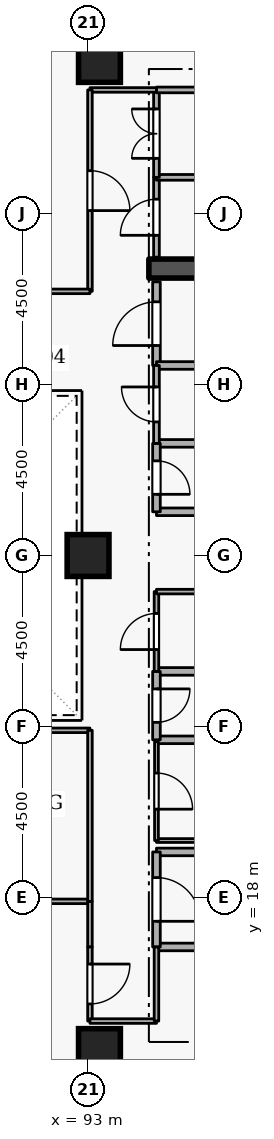
"""IFC4 building model, lengths in metres.
Left out: names, types, materials, properties, quantities, classifications, styles, units other than length and angle.
Written with IfcOpenShell. Run it as: python <this file> out.ifc"""

import sys

from ifc_helpers import new_model, si_unit, direction, frame, frame_2d, origin, origin_2d, place, context, subcontext, project, spatial, rectangle, extrude, element, fill, save


model = new_model("IFC4")
c1 = context("Model", 3, precision=1e-05, world=origin(), true_north=direction((0.0, 1.0)))
c2 = subcontext(c1, "Body", "Model", "MODEL_VIEW")
j1 = project(units=[si_unit("LENGTHUNIT", "METRE"), si_unit("PLANEANGLEUNIT", "RADIAN")], contexts=[c1])
p1 = place(None, origin())
s1 = spatial("IfcSite", under=j1, at=p1, CompositionType="ELEMENT")
p2 = place(p1, origin())
s2 = spatial("IfcBuilding", under=s1, at=p2, CompositionType="ELEMENT")
p3 = place(p2, frame((0.0, 0.0, 159.9)))
s3 = spatial("IfcBuildingStorey", under=s2, at=p3, CompositionType="ELEMENT", Elevation=159.9)
p4 = place(p3, frame((94.6, 34.55, 0.0), z_axis=(0.0, 0.0, 1.0), x_axis=(1.0, 0.0, 0.0)))
e1 = element("IfcWall", 1, at=p4, inside=s3, PredefinedType="SHEAR", context=c2, shape_type="SweptSolid", body=[
    extrude(rectangle(XDim=5.8, YDim=0.5, at=frame_2d((2.9, 0.0))), origin(), (0.0, 0.0, 1.0), 3.6),
])
for number, where, z_axis, x_axis in (
    (2, (93.3, 14.0, 0.0), (0.0, 0.0, 1.0), (1.0, 0.0, 0.0)),
    (3, (93.3, 40.0, 0.0), (0.0, 0.0, 1.0), (1.0, 0.0, 0.0)),
    (4, (93.0, 27.0, 0.0), (0.0, 0.0, 1.0), (1.0, 0.0, 0.0)),
):
    element("IfcColumn", number, at=place(p3, frame(where, z_axis=z_axis, x_axis=x_axis)), inside=s3, PredefinedType="COLUMN", context=c2, shape_type="SweptSolid", body=[
        extrude(rectangle(XDim=1.1, YDim=1.1, at=origin_2d()), origin(), (0.0, 0.0, 1.0), 3.6),
    ])
p5 = place(p3, frame((94.8, 16.7, 0.0), z_axis=(0.0, 0.0, 1.0), x_axis=(1.0, 0.0, 0.0)))
e5 = element("IfcWall", 5, at=p5, inside=s3, PredefinedType="STANDARD", context=c2, shape_type="SweptSolid", body=[
    extrude(rectangle(XDim=5.7, YDim=0.2, at=frame_2d((2.85, 0.0))), origin(), (0.0, 0.0, 1.0), 3.34),
])
p6 = place(p3, frame((97.1, 19.2, 0.0), z_axis=(0.0, 0.0, 1.0), x_axis=(-1.0, 0.0, 0.0)))
e6 = element("IfcWall", 6, at=p6, inside=s3, PredefinedType="STANDARD", context=c2, shape_type="SweptSolid", body=[
    extrude(rectangle(XDim=2.3, YDim=0.2, at=frame_2d((1.15, 0.0))), origin(), (0.0, 0.0, 1.0), 2.545),
])
p7 = place(p3, frame((94.8, 19.2, 0.0), z_axis=(0.0, 0.0, 1.0), x_axis=(0.0, -1.0, 0.0)))
e7 = element("IfcWall", 7, at=p7, inside=s3, PredefinedType="STANDARD", context=c2, shape_type="SweptSolid", body=[
    extrude(rectangle(XDim=2.5, YDim=0.2, at=frame_2d((1.25, 0.0))), origin(), (0.0, 0.0, 1.0), 3.34),
])
p8 = place(p7, frame((0.675, 0.0, 0.0)))
e8 = element("IfcOpeningElement", 8, at=p8, cuts=e7, PredefinedType="OPENING", context=c2, shape_type="SweptSolid", body=[
    extrude(rectangle(XDim=1.15, YDim=2.1, at=frame_2d((0.575, 1.05))), frame((0.0, 0.11, 0.0), z_axis=(0.0, -1.0, 0.0), x_axis=(1.0, 0.0, 0.0)), (0.0, 0.0, 1.0), 0.22),
])
for number, where, z_axis, x_axis in (
    (9, (94.8, 28.15, 0.0), (0.0, 0.0, 1.0), (1.0, 0.0, 0.0)),
    (10, (96.85, 29.95, 0.0), (0.0, 0.0, 1.0), (-1.0, 0.0, 0.0)),
):
    element("IfcWall", number, at=place(p3, frame(where, z_axis=z_axis, x_axis=x_axis)), inside=s3, PredefinedType="STANDARD", context=c2, shape_type="SweptSolid", body=[
        extrude(rectangle(XDim=2.05, YDim=0.2, at=frame_2d((1.025, 0.0))), origin(), (0.0, 0.0, 1.0), 3.34),
    ])
p9 = place(p3, frame((94.8, 29.95, 0.0), z_axis=(0.0, 0.0, 1.0), x_axis=(0.0, -1.0, 0.0)))
e11 = element("IfcWall", 11, at=p9, inside=s3, PredefinedType="STANDARD", context=c2, shape_type="SweptSolid", body=[
    extrude(rectangle(XDim=1.8, YDim=0.2, at=frame_2d((0.9, 0.0))), origin(), (0.0, 0.0, 1.0), 3.34),
])
p10 = place(p9, frame((0.46, 0.0, 0.0)))
e12 = element("IfcOpeningElement", 12, at=p10, cuts=e11, PredefinedType="OPENING", context=c2, shape_type="SweptSolid", body=[
    extrude(rectangle(XDim=0.88, YDim=2.04, at=frame_2d((0.44, 1.02))), frame((0.0, 0.11, 0.0), z_axis=(0.0, -1.0, 0.0), x_axis=(1.0, 0.0, 0.0)), (0.0, 0.0, 1.0), 0.22),
])
for number, where, z_axis, x_axis in (
    (13, (94.8, 22.15, 0.0), (0.0, 0.0, 1.0), (1.0, 0.0, 0.0)),
    (14, (96.85, 23.95, 0.0), (0.0, 0.0, 1.0), (-1.0, 0.0, 0.0)),
):
    element("IfcWall", number, at=place(p3, frame(where, z_axis=z_axis, x_axis=x_axis)), inside=s3, PredefinedType="STANDARD", context=c2, shape_type="SweptSolid", body=[
        extrude(rectangle(XDim=2.05, YDim=0.2, at=frame_2d((1.025, 0.0))), origin(), (0.0, 0.0, 1.0), 3.34),
    ])
p11 = place(p3, frame((94.8, 23.95, 0.0), z_axis=(0.0, 0.0, 1.0), x_axis=(0.0, -1.0, 0.0)))
e15 = element("IfcWall", 15, at=p11, inside=s3, PredefinedType="STANDARD", context=c2, shape_type="SweptSolid", body=[
    extrude(rectangle(XDim=1.8, YDim=0.2, at=frame_2d((0.9, 0.0))), origin(), (0.0, 0.0, 1.0), 3.34),
])
p12 = place(p11, frame((0.46, 0.0, 0.0)))
e16 = element("IfcOpeningElement", 16, at=p12, cuts=e15, PredefinedType="OPENING", context=c2, shape_type="SweptSolid", body=[
    extrude(rectangle(XDim=0.88, YDim=2.04, at=frame_2d((0.44, 1.02))), frame((0.0, 0.11, 0.0), z_axis=(0.0, -1.0, 0.0), x_axis=(1.0, 0.0, 0.0)), (0.0, 0.0, 1.0), 0.22),
])
p13 = place(p3, frame((94.8, 32.0, 0.0), z_axis=(0.0, 0.0, 1.0), x_axis=(0.0, 1.0, 0.0)))
e17 = element("IfcWall", 17, at=p13, inside=s3, PredefinedType="STANDARD", context=c2, shape_type="SweptSolid", body=[
    extrude(rectangle(XDim=2.2, YDim=0.2, at=frame_2d((1.1, 0.0))), origin(), (0.0, 0.0, 1.0), 3.34),
])
p14 = place(p13, frame((0.525, 0.0, 0.0)))
e18 = element("IfcOpeningElement", 18, at=p14, cuts=e17, PredefinedType="OPENING", context=c2, shape_type="SweptSolid", body=[
    extrude(rectangle(XDim=1.15, YDim=2.1, at=frame_2d((0.575, 1.05))), frame((0.0, 0.11, 0.0), z_axis=(0.0, -1.0, 0.0), x_axis=(1.0, 0.0, 0.0)), (0.0, 0.0, 1.0), 0.22),
])
p15 = place(p3, frame((96.85, 32.0, 0.0), z_axis=(0.0, 0.0, 1.0), x_axis=(-1.0, 0.0, 0.0)))
e19 = element("IfcWall", 19, at=p15, inside=s3, PredefinedType="STANDARD", context=c2, shape_type="SweptSolid", body=[
    extrude(rectangle(XDim=2.05, YDim=0.2, at=frame_2d((1.025, 0.0))), origin(), (0.0, 0.0, 1.0), 3.34),
])
p16 = place(p3, frame((94.8, 19.5, 0.0), z_axis=(0.0, 0.0, 1.0), x_axis=(1.0, 0.0, 0.0)))
e20 = element("IfcWall", 20, at=p16, inside=s3, PredefinedType="PARTITIONING", context=c2, shape_type="SweptSolid", body=[
    extrude(rectangle(XDim=2.05, YDim=0.1, at=frame_2d((1.025, 0.0))), origin(), (0.0, 0.0, 1.0), 2.545),
])
p17 = place(p3, frame((94.8, 22.1, 0.0), z_axis=(0.0, 0.0, 1.0), x_axis=(0.0, -1.0, 0.0)))
e21 = element("IfcWall", 21, at=p17, inside=s3, PredefinedType="PARTITIONING", context=c2, shape_type="SweptSolid", body=[
    extrude(rectangle(XDim=2.6, YDim=0.1, at=frame_2d((1.3, 0.0))), origin(), (0.0, 0.0, 1.0), 3.34),
])
p18 = place(p17, frame((0.825, 0.0, 0.0)))
e22 = element("IfcOpeningElement", 22, at=p18, cuts=e21, PredefinedType="OPENING", context=c2, shape_type="SweptSolid", body=[
    extrude(rectangle(XDim=0.95, YDim=2.1, at=frame_2d((0.475, 1.05))), frame((0.0, 0.06, 0.0), z_axis=(0.0, -1.0, 0.0), x_axis=(1.0, 0.0, 0.0)), (0.0, 0.0, 1.0), 0.12),
])
p19 = place(p3, frame((94.8, 23.95, 0.0), z_axis=(0.0, 0.0, 1.0), x_axis=(0.0, 1.0, 0.0)))
e23 = element("IfcWall", 23, at=p19, inside=s3, PredefinedType="PARTITIONING", context=c2, shape_type="SweptSolid", body=[
    extrude(rectangle(XDim=2.1, YDim=0.12, at=frame_2d((1.05, 0.0))), origin(), (0.0, 0.0, 1.0), 3.34),
])
p20 = place(p19, frame((0.575, 0.0, 0.0)))
e24 = element("IfcOpeningElement", 24, at=p20, cuts=e23, PredefinedType="OPENING", context=c2, shape_type="SweptSolid", body=[
    extrude(rectangle(XDim=0.95, YDim=2.1, at=frame_2d((0.475, 1.05))), frame((0.0, 0.07, 0.0), z_axis=(0.0, -1.0, 0.0), x_axis=(1.0, 0.0, 0.0)), (0.0, 0.0, 1.0), 0.14),
])
p21 = place(p3, frame((94.8, 26.05, 0.0), z_axis=(0.0, 0.0, 1.0), x_axis=(1.0, 0.0, 0.0)))
e25 = element("IfcWall", 25, at=p21, inside=s3, PredefinedType="PARTITIONING", context=c2, shape_type="SweptSolid", body=[
    extrude(rectangle(XDim=2.05, YDim=0.12, at=frame_2d((1.025, 0.0))), origin(), (0.0, 0.0, 1.0), 3.34),
])
p22 = place(p3, frame((94.8, 29.95, 0.0), z_axis=(0.0, 0.0, 1.0), x_axis=(0.0, 1.0, 0.0)))
e26 = element("IfcWall", 26, at=p22, inside=s3, PredefinedType="PARTITIONING", context=c2, shape_type="SweptSolid", body=[
    extrude(rectangle(XDim=2.05, YDim=0.15, at=frame_2d((1.025, 0.0))), origin(), (0.0, 0.0, 1.0), 3.34),
])
p23 = place(p22, frame((0.565, 0.0, 0.0)))
e27 = element("IfcOpeningElement", 27, at=p23, cuts=e26, PredefinedType="OPENING", context=c2, shape_type="SweptSolid", body=[
    extrude(rectangle(XDim=0.92, YDim=2.08, at=frame_2d((0.46, 1.04))), frame((0.0, 0.085, 0.0), z_axis=(0.0, -1.0, 0.0), x_axis=(1.0, 0.0, 0.0)), (0.0, 0.0, 1.0), 0.17),
])
p24 = place(p3, frame((94.8, 34.85, 0.0), z_axis=(0.0, 0.0, 1.0), x_axis=(0.0, 1.0, 0.0)))
e28 = element("IfcWall", 28, at=p24, inside=s3, PredefinedType="PARTITIONING", context=c2, shape_type="SweptSolid", body=[
    extrude(rectangle(XDim=2.1, YDim=0.15, at=frame_2d((1.05, 0.0))), origin(), (0.0, 0.0, 1.0), 3.34),
])
p25 = place(p24, frame((0.575, 0.0, 0.0)))
e29 = element("IfcOpeningElement", 29, at=p25, cuts=e28, PredefinedType="OPENING", context=c2, shape_type="SweptSolid", body=[
    extrude(rectangle(XDim=0.95, YDim=2.1, at=frame_2d((0.475, 1.05))), frame((0.0, 0.085, 0.0), z_axis=(0.0, -1.0, 0.0), x_axis=(1.0, 0.0, 0.0)), (0.0, 0.0, 1.0), 0.17),
])
p26 = place(p3, frame((94.8, 36.95, 0.0), z_axis=(0.0, 0.0, 1.0), x_axis=(1.0, 0.0, 0.0)))
e30 = element("IfcWall", 30, at=p26, inside=s3, PredefinedType="PARTITIONING", context=c2, shape_type="SweptSolid", body=[
    extrude(rectangle(XDim=5.65, YDim=0.15, at=frame_2d((2.825, 0.0))), origin(), (0.0, 0.0, 1.0), 3.34),
])
p27 = place(p3, frame((94.8, 36.95, 0.0), z_axis=(0.0, 0.0, 1.0), x_axis=(0.0, 1.0, 0.0)))
e31 = element("IfcWall", 31, at=p27, inside=s3, PredefinedType="PARTITIONING", context=c2, shape_type="SweptSolid", body=[
    extrude(rectangle(XDim=2.3, YDim=0.15, at=frame_2d((1.15, 0.0))), origin(), (0.0, 0.0, 1.0), 3.34),
])
p28 = place(p27, frame((0.5, 0.0, 0.0)))
e32 = element("IfcOpeningElement", 32, at=p28, cuts=e31, PredefinedType="OPENING", context=c2, shape_type="SweptSolid", body=[
    extrude(rectangle(XDim=1.3, YDim=2.12, at=frame_2d((0.65, 1.06))), frame((0.0, 0.085, 0.0), z_axis=(0.0, -1.0, 0.0), x_axis=(1.0, 0.0, 0.0)), (0.0, 0.0, 1.0), 0.17),
])
p29 = place(p3, frame((94.8, 39.25, 0.0), z_axis=(0.0, 0.0, 1.0), x_axis=(1.0, 0.0, 0.0)))
e33 = element("IfcWall", 33, at=p29, inside=s3, PredefinedType="PARTITIONING", context=c2, shape_type="SweptSolid", body=[
    extrude(rectangle(XDim=5.65, YDim=0.15, at=frame_2d((2.825, 0.0))), origin(), (0.0, 0.0, 1.0), 3.34),
])
p30 = place(p3, frame((88.5, 17.9, 0.0), z_axis=(0.0, 0.0, 1.0), x_axis=(1.0, 0.0, 0.0)))
e34 = element("IfcWall", 34, at=p30, inside=s3, PredefinedType="PARTITIONING", context=c2, shape_type="SweptSolid", body=[
    extrude(rectangle(XDim=4.55, YDim=0.12, at=frame_2d((2.275, 0.0))), origin(), (0.0, 0.0, 1.0), 3.34),
])
p31 = place(p3, frame((93.05, 17.9, 0.0), z_axis=(0.0, 0.0, 1.0), x_axis=(0.0, -1.0, 0.0)))
e35 = element("IfcWall", 35, at=p31, inside=s3, PredefinedType="PARTITIONING", context=c2, shape_type="SweptSolid", body=[
    extrude(rectangle(XDim=1.2, YDim=0.12, at=frame_2d((0.6, 0.0))), origin(), (0.0, 0.0, 1.0), 3.34),
])
p32 = place(p3, frame((93.05, 16.7, 0.0), z_axis=(0.0, 0.0, 1.0), x_axis=(0.0, -1.0, 0.0)))
e36 = element("IfcWall", 36, at=p32, inside=s3, PredefinedType="PARTITIONING", context=c2, shape_type="SweptSolid", body=[
    extrude(rectangle(XDim=1.95, YDim=0.12, at=frame_2d((0.975, 0.0))), origin(), (0.0, 0.0, 1.0), 3.34),
])
p33 = place(p32, frame((0.45, 0.0, 0.0)))
e37 = element("IfcOpeningElement", 37, at=p33, cuts=e36, PredefinedType="OPENING", context=c2, shape_type="SweptSolid", body=[
    extrude(rectangle(XDim=1.05, YDim=2.1, at=frame_2d((0.525, 1.05))), frame((0.0, 0.07, 0.0), z_axis=(0.0, -1.0, 0.0), x_axis=(1.0, 0.0, 0.0)), (0.0, 0.0, 1.0), 0.14),
])
p34 = place(p3, frame((93.05, 14.75, 0.0), z_axis=(0.0, 0.0, 1.0), x_axis=(1.0, 0.0, 0.0)))
e38 = element("IfcWall", 38, at=p34, inside=s3, PredefinedType="PARTITIONING", context=c2, shape_type="SweptSolid", body=[
    extrude(rectangle(XDim=1.75, YDim=0.12, at=frame_2d((0.875, 0.0))), origin(), (0.0, 0.0, 1.0), 3.34),
])
p35 = place(p3, frame((94.8, 14.75, 0.0), z_axis=(0.0, 0.0, 1.0), x_axis=(0.0, 1.0, 0.0)))
e39 = element("IfcWall", 39, at=p35, inside=s3, PredefinedType="PARTITIONING", context=c2, shape_type="SweptSolid", body=[
    extrude(rectangle(XDim=1.95, YDim=0.12, at=frame_2d((0.975, 0.0))), origin(), (0.0, 0.0, 1.0), 3.34),
])
p36 = place(p3, frame((83.95, 22.4, 0.0), z_axis=(0.0, 0.0, 1.0), x_axis=(1.0, 0.0, 0.0)))
e40 = element("IfcWall", 40, at=p36, inside=s3, PredefinedType="PARTITIONING", context=c2, shape_type="SweptSolid", body=[
    extrude(rectangle(XDim=9.1, YDim=0.12, at=frame_2d((4.55, 0.0))), origin(), (0.0, 0.0, 1.0), 3.34),
])
p37 = place(p3, frame((93.05, 22.4, 0.0), z_axis=(0.0, 0.0, 1.0), x_axis=(0.0, -1.0, 0.0)))
e41 = element("IfcWall", 41, at=p37, inside=s3, PredefinedType="PARTITIONING", context=c2, shape_type="SweptSolid", body=[
    extrude(rectangle(XDim=4.5, YDim=0.12, at=frame_2d((2.25, 0.0))), origin(), (0.0, 0.0, 1.0), 3.34),
])
p38 = place(p3, frame((94.8, 39.25, 0.0), z_axis=(0.0, 0.0, 1.0), x_axis=(-1.0, 0.0, 0.0)))
e42 = element("IfcWall", 42, at=p38, inside=s3, PredefinedType="PARTITIONING", context=c2, shape_type="SweptSolid", body=[
    extrude(rectangle(XDim=1.75, YDim=0.12, at=frame_2d((0.875, 0.0))), origin(), (0.0, 0.0, 1.0), 3.34),
])
p39 = place(p3, frame((93.05, 39.25, 0.0), z_axis=(0.0, 0.0, 1.0), x_axis=(0.0, -1.0, 0.0)))
e43 = element("IfcWall", 43, at=p39, inside=s3, PredefinedType="PARTITIONING", context=c2, shape_type="SweptSolid", body=[
    extrude(rectangle(XDim=5.3, YDim=0.12, at=frame_2d((2.65, 0.0))), origin(), (0.0, 0.0, 1.0), 3.34),
])
p40 = place(p39, frame((2.125, 0.0, 0.0)))
e44 = element("IfcOpeningElement", 44, at=p40, cuts=e43, PredefinedType="OPENING", context=c2, shape_type="SweptSolid", body=[
    extrude(rectangle(XDim=1.05, YDim=2.1, at=frame_2d((0.525, 1.05))), frame((0.0, 0.07, 0.0), z_axis=(0.0, -1.0, 0.0), x_axis=(1.0, 0.0, 0.0)), (0.0, 0.0, 1.0), 0.14),
])
p41 = place(p3, frame((93.05, 33.95, 0.0), z_axis=(0.0, 0.0, 1.0), x_axis=(-1.0, 0.0, 0.0)))
e45 = element("IfcWall", 45, at=p41, inside=s3, PredefinedType="PARTITIONING", context=c2, shape_type="SweptSolid", body=[
    extrude(rectangle(XDim=2.95, YDim=0.12, at=frame_2d((1.475, 0.0))), origin(), (0.0, 0.0, 1.0), 3.34),
])
p42 = place(p8, origin())
e46 = element("IfcDoor", 46, at=p42, inside=s3, OperationType="SINGLE_SWING_RIGHT", PredefinedType="DOOR", context=c2, shape_type="SweptSolid", body=[
    extrude(rectangle(XDim=1.15, YDim=2.1, at=frame_2d((0.575, 1.05))), frame((0.0, 0.025, 0.0), z_axis=(0.0, -1.0, 0.0), x_axis=(1.0, 0.0, 0.0)), (0.0, 0.0, 1.0), 0.05),
])
fill(e8, e46)
p43 = place(p10, origin())
e47 = element("IfcDoor", 47, at=p43, inside=s3, OperationType="SINGLE_SWING_RIGHT", PredefinedType="DOOR", context=c2, shape_type="SweptSolid", body=[
    extrude(rectangle(XDim=0.88, YDim=2.04, at=frame_2d((0.44, 1.02))), frame((0.0, 0.025, 0.0), z_axis=(0.0, -1.0, 0.0), x_axis=(1.0, 0.0, 0.0)), (0.0, 0.0, 1.0), 0.05),
])
fill(e12, e47)
p44 = place(p12, origin())
e48 = element("IfcDoor", 48, at=p44, inside=s3, OperationType="SINGLE_SWING_LEFT", PredefinedType="DOOR", context=c2, shape_type="SweptSolid", body=[
    extrude(rectangle(XDim=0.88, YDim=2.04, at=frame_2d((0.44, 1.02))), frame((0.0, 0.025, 0.0), z_axis=(0.0, -1.0, 0.0), x_axis=(1.0, 0.0, 0.0)), (0.0, 0.0, 1.0), 0.05),
])
fill(e16, e48)
p45 = place(p18, origin())
e49 = element("IfcDoor", 49, at=p45, inside=s3, OperationType="SINGLE_SWING_RIGHT", PredefinedType="DOOR", context=c2, shape_type="SweptSolid", body=[
    extrude(rectangle(XDim=0.95, YDim=2.1, at=frame_2d((0.475, 1.05))), frame((0.0, 0.025, 0.0), z_axis=(0.0, -1.0, 0.0), x_axis=(1.0, 0.0, 0.0)), (0.0, 0.0, 1.0), 0.05),
])
fill(e22, e49)
p46 = place(p20, origin())
e50 = element("IfcDoor", 50, at=p46, inside=s3, OperationType="SINGLE_SWING_LEFT", PredefinedType="DOOR", context=c2, shape_type="SweptSolid", body=[
    extrude(rectangle(XDim=0.95, YDim=2.1, at=frame_2d((0.475, 1.05))), frame((0.0, 0.025, 0.0), z_axis=(0.0, -1.0, 0.0), x_axis=(1.0, 0.0, 0.0)), (0.0, 0.0, 1.0), 0.05),
])
fill(e24, e50)
p47 = place(p23, origin())
e51 = element("IfcDoor", 51, at=p47, inside=s3, OperationType="SINGLE_SWING_RIGHT", PredefinedType="DOOR", context=c2, shape_type="SweptSolid", body=[
    extrude(rectangle(XDim=0.92, YDim=2.08, at=frame_2d((0.46, 1.04))), frame((0.0, 0.025, 0.0), z_axis=(0.0, -1.0, 0.0), x_axis=(1.0, 0.0, 0.0)), (0.0, 0.0, 1.0), 0.05),
])
fill(e27, e51)
p48 = place(p14, origin())
e52 = element("IfcDoor", 52, at=p48, inside=s3, OperationType="SINGLE_SWING_LEFT", PredefinedType="DOOR", context=c2, shape_type="SweptSolid", body=[
    extrude(rectangle(XDim=1.15, YDim=2.1, at=frame_2d((0.575, 1.05))), frame((0.0, 0.025, 0.0), z_axis=(0.0, -1.0, 0.0), x_axis=(1.0, 0.0, 0.0)), (0.0, 0.0, 1.0), 0.05),
])
fill(e18, e52)
p49 = place(p25, origin())
e53 = element("IfcDoor", 53, at=p49, inside=s3, OperationType="SINGLE_SWING_LEFT", PredefinedType="DOOR", context=c2, shape_type="SweptSolid", body=[
    extrude(rectangle(XDim=0.95, YDim=2.1, at=frame_2d((0.475, 1.05))), frame((0.0, 0.025, 0.0), z_axis=(0.0, -1.0, 0.0), x_axis=(1.0, 0.0, 0.0)), (0.0, 0.0, 1.0), 0.05),
])
fill(e29, e53)
p50 = place(p28, origin())
e54 = element("IfcDoor", 54, at=p50, inside=s3, OperationType="DOUBLE_DOOR_SINGLE_SWING", PredefinedType="DOOR", context=c2, shape_type="SweptSolid", body=[
    extrude(rectangle(XDim=1.3, YDim=2.12, at=frame_2d((0.65, 1.06))), frame((0.0, 0.025, 0.0), z_axis=(0.0, -1.0, 0.0), x_axis=(1.0, 0.0, 0.0)), (0.0, 0.0, 1.0), 0.05),
])
fill(e32, e54)
p51 = place(p33, origin())
e55 = element("IfcDoor", 55, at=p51, inside=s3, OperationType="SINGLE_SWING_LEFT", PredefinedType="DOOR", context=c2, shape_type="SweptSolid", body=[
    extrude(rectangle(XDim=1.05, YDim=2.1, at=frame_2d((0.525, 1.05))), frame((0.0, 0.025, 0.0), z_axis=(0.0, -1.0, 0.0), x_axis=(1.0, 0.0, 0.0)), (0.0, 0.0, 1.0), 0.05),
])
fill(e37, e55)
p52 = place(p40, origin())
e56 = element("IfcDoor", 56, at=p52, inside=s3, OperationType="SINGLE_SWING_RIGHT", PredefinedType="DOOR", context=c2, shape_type="SweptSolid", body=[
    extrude(rectangle(XDim=1.05, YDim=2.1, at=frame_2d((0.525, 1.05))), frame((0.0, 0.025, 0.0), z_axis=(0.0, -1.0, 0.0), x_axis=(1.0, 0.0, 0.0)), (0.0, 0.0, 1.0), 0.05),
])
fill(e44, e56)
save(model, sys.argv[1])
